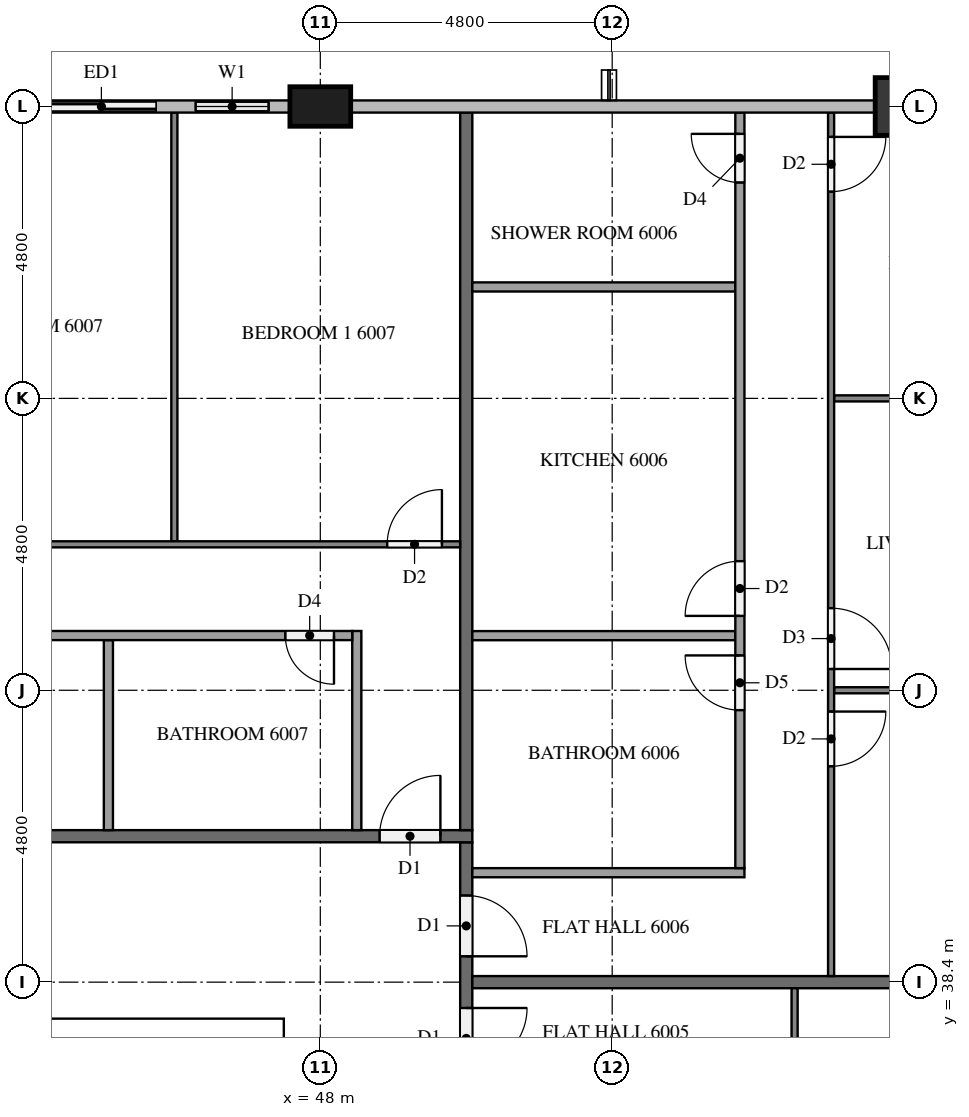
"""IFC4 building model, lengths in metres.
Left out: names, types, materials, properties, quantities, classifications, styles, units other than length and angle.
Written with IfcOpenShell. Run it as: python <this file> out.ifc"""

import sys

from ifc_helpers import new_model, si_unit, direction, frame, frame_2d, origin, origin_2d, place, context, subcontext, project, spatial, rectangle, extrude, element, fill, save


model = new_model("IFC4")
c1 = context("Model", 3, precision=1e-05, world=origin(), true_north=direction((0.0, 1.0)))
c2 = subcontext(c1, "Body", "Model", "MODEL_VIEW")
j1 = project(units=[si_unit("LENGTHUNIT", "METRE"), si_unit("PLANEANGLEUNIT", "RADIAN")], contexts=[c1])
p1 = place(None, origin())
s1 = spatial("IfcSite", under=j1, at=p1, CompositionType="ELEMENT")
p2 = place(p1, origin())
s2 = spatial("IfcBuilding", under=s1, at=p2, CompositionType="ELEMENT")
p3 = place(p2, frame((0.0, 0.0, 229.8)))
s3 = spatial("IfcBuildingStorey", under=s2, at=p3, CompositionType="ELEMENT", Elevation=229.8)
p4 = place(p3, frame((15.0, 37.45, 0.0), z_axis=(0.0, 0.0, 1.0), x_axis=(1.0, 0.0, 0.0)))
e1 = element("IfcWall", 1, at=p4, inside=s3, PredefinedType="SHEAR", context=c2, shape_type="SweptSolid", body=[
    extrude(rectangle(XDim=32.4, YDim=0.7, at=frame_2d((16.2, 0.0))), origin(), (0.0, 0.0, 1.0), 3.1),
])
p5 = place(p4, frame((15.3, 0.0, 0.0)))
e2 = element("IfcOpeningElement", 2, at=p5, cuts=e1, PredefinedType="OPENING", context=c2, shape_type="SweptSolid", body=[
    extrude(rectangle(XDim=1.8, YDim=2.1, at=frame_2d((0.9, 1.05))), frame((0.0, 0.36, 0.0), z_axis=(0.0, -1.0, 0.0), x_axis=(1.0, 0.0, 0.0)), (0.0, 0.0, 1.0), 0.72),
])
p6 = place(p4, frame((1.544, 0.0, 0.0)))
e3 = element("IfcOpeningElement", 3, at=p6, cuts=e1, PredefinedType="OPENING", context=c2, shape_type="SweptSolid", body=[
    extrude(rectangle(XDim=1.0, YDim=2.1, at=frame_2d((0.5, 1.05))), frame((0.0, 0.36, 0.0), z_axis=(0.0, -1.0, 0.0), x_axis=(1.0, 0.0, 0.0)), (0.0, 0.0, 1.0), 0.72),
])
p7 = place(p4, frame((5.219, 0.0, 0.0)))
e4 = element("IfcOpeningElement", 4, at=p7, cuts=e1, PredefinedType="OPENING", context=c2, shape_type="SweptSolid", body=[
    extrude(rectangle(XDim=1.0, YDim=2.1, at=frame_2d((0.5, 1.05))), frame((0.0, 0.36, 0.0), z_axis=(0.0, -1.0, 0.0), x_axis=(1.0, 0.0, 0.0)), (0.0, 0.0, 1.0), 0.72),
])
p8 = place(p3, frame((57.6, 52.8, 0.0), z_axis=(0.0, 0.0, 1.0), x_axis=(1.0, 0.0, 0.0)))
e5 = element("IfcColumn", 5, at=p8, inside=s3, PredefinedType="COLUMN", context=c2, shape_type="SweptSolid", body=[
    extrude(rectangle(XDim=0.95, YDim=0.95, at=origin_2d()), origin(), (0.0, 0.0, 1.0), 3.1),
])
p9 = place(p3, frame((48.0, 52.8, 0.0), z_axis=(0.0, 0.0, 1.0), x_axis=(1.0, 0.0, 0.0)))
e6 = element("IfcColumn", 6, at=p9, inside=s3, PredefinedType="COLUMN", context=c2, shape_type="SweptSolid", body=[
    extrude(rectangle(XDim=1.0, YDim=0.65, at=origin_2d()), origin(), (0.0, 0.0, 1.0), 3.1),
])
p10 = place(p3, frame((47.5, 52.8, 0.0), z_axis=(0.0, 0.0, 1.0), x_axis=(-1.0, 0.0, 0.0)))
e7 = element("IfcWall", 7, at=p10, inside=s3, PredefinedType="SOLIDWALL", context=c2, shape_type="SweptSolid", body=[
    extrude(rectangle(XDim=4.3, YDim=0.15, at=frame_2d((2.15, 0.0))), origin(), (0.0, 0.0, 1.0), 3.1),
])
p11 = place(p10, frame((0.35, 0.0, 0.9)))
e8 = element("IfcOpeningElement", 8, at=p11, cuts=e7, PredefinedType="OPENING", context=c2, shape_type="SweptSolid", body=[
    extrude(rectangle(XDim=1.2, YDim=1.4, at=frame_2d((0.6, 0.7))), frame((0.0, 0.085, 0.0), z_axis=(0.0, -1.0, 0.0), x_axis=(1.0, 0.0, 0.0)), (0.0, 0.0, 1.0), 0.17),
])
p12 = place(p10, frame((2.2, 0.0, 0.0)))
e9 = element("IfcOpeningElement", 9, at=p12, cuts=e7, PredefinedType="OPENING", context=c2, shape_type="SweptSolid", body=[
    extrude(rectangle(XDim=1.8, YDim=2.4, at=frame_2d((0.9, 1.2))), frame((0.0, 0.085, 0.0), z_axis=(0.0, -1.0, 0.0), x_axis=(1.0, 0.0, 0.0)), (0.0, 0.0, 1.0), 0.17),
])
p13 = place(p3, frame((50.4, 40.7, 0.0), z_axis=(0.0, 0.0, 1.0), x_axis=(0.0, -1.0, 0.0)))
e10 = element("IfcWall", 10, at=p13, inside=s3, PredefinedType="PARTITIONING", context=c2, shape_type="SweptSolid", body=[
    extrude(rectangle(XDim=28.6, YDim=0.2, at=frame_2d((14.3, 0.0))), origin(), (0.0, 0.0, 1.0), 3.1),
])
p14 = place(p13, frame((27.275, 0.0, 0.0)))
e11 = element("IfcOpeningElement", 11, at=p14, cuts=e10, PredefinedType="OPENING", context=c2, shape_type="SweptSolid", body=[
    extrude(rectangle(XDim=1.0, YDim=2.1, at=frame_2d((0.5, 1.05))), frame((0.0, 0.11, 0.0), z_axis=(0.0, -1.0, 0.0), x_axis=(1.0, 0.0, 0.0)), (0.0, 0.0, 1.0), 0.22),
])
p15 = place(p13, frame((2.725, 0.0, 0.0)))
e12 = element("IfcOpeningElement", 12, at=p15, cuts=e10, PredefinedType="OPENING", context=c2, shape_type="SweptSolid", body=[
    extrude(rectangle(XDim=1.0, YDim=2.1, at=frame_2d((0.5, 1.05))), frame((0.0, 0.11, 0.0), z_axis=(0.0, -1.0, 0.0), x_axis=(1.0, 0.0, 0.0)), (0.0, 0.0, 1.0), 0.22),
])
p16 = place(p13, frame((0.875, 0.0, 0.0)))
e13 = element("IfcOpeningElement", 13, at=p16, cuts=e10, PredefinedType="OPENING", context=c2, shape_type="SweptSolid", body=[
    extrude(rectangle(XDim=1.0, YDim=2.1, at=frame_2d((0.5, 1.05))), frame((0.0, 0.11, 0.0), z_axis=(0.0, -1.0, 0.0), x_axis=(1.0, 0.0, 0.0)), (0.0, 0.0, 1.0), 0.22),
])
p17 = place(p3, frame((11.9, 40.8, 0.0), z_axis=(0.0, 0.0, 1.0), x_axis=(1.0, 0.0, 0.0)))
e14 = element("IfcWall", 14, at=p17, inside=s3, PredefinedType="PARTITIONING", context=c2, shape_type="SweptSolid", body=[
    extrude(rectangle(XDim=38.6, YDim=0.2, at=frame_2d((19.3, 0.0))), origin(), (0.0, 0.0, 1.0), 3.1),
])
p18 = place(p17, frame((37.075, 0.0, 0.0)))
e15 = element("IfcOpeningElement", 15, at=p18, cuts=e14, PredefinedType="OPENING", context=c2, shape_type="SweptSolid", body=[
    extrude(rectangle(XDim=1.0, YDim=2.1, at=frame_2d((0.5, 1.05))), frame((0.0, 0.11, 0.0), z_axis=(0.0, -1.0, 0.0), x_axis=(1.0, 0.0, 0.0)), (0.0, 0.0, 1.0), 0.22),
])
p19 = place(p17, frame((12.525, 0.0, 0.0)))
e16 = element("IfcOpeningElement", 16, at=p19, cuts=e14, PredefinedType="OPENING", context=c2, shape_type="SweptSolid", body=[
    extrude(rectangle(XDim=1.0, YDim=2.1, at=frame_2d((0.5, 1.05))), frame((0.0, 0.11, 0.0), z_axis=(0.0, -1.0, 0.0), x_axis=(1.0, 0.0, 0.0)), (0.0, 0.0, 1.0), 0.22),
])
p20 = place(p17, frame((10.625, 0.0, 0.0)))
e17 = element("IfcOpeningElement", 17, at=p20, cuts=e14, PredefinedType="OPENING", context=c2, shape_type="SweptSolid", body=[
    extrude(rectangle(XDim=1.1, YDim=2.1, at=frame_2d((0.55, 1.05))), frame((0.0, 0.11, 0.0), z_axis=(0.0, -1.0, 0.0), x_axis=(1.0, 0.0, 0.0)), (0.0, 0.0, 1.0), 0.22),
])
p21 = place(p3, frame((50.5, 38.4, 0.0), z_axis=(0.0, 0.0, 1.0), x_axis=(1.0, 0.0, 0.0)))
e18 = element("IfcWall", 18, at=p21, inside=s3, PredefinedType="PARTITIONING", context=c2, shape_type="SweptSolid", body=[
    extrude(rectangle(XDim=11.575, YDim=0.2, at=frame_2d((5.788, 0.0))), origin(), (0.0, 0.0, 1.0), 3.1),
])
p22 = place(p3, frame((50.4, 40.9, 0.0), z_axis=(0.0, 0.0, 1.0), x_axis=(0.0, 1.0, 0.0)))
e19 = element("IfcWall", 19, at=p22, inside=s3, PredefinedType="PARTITIONING", context=c2, shape_type="SweptSolid", body=[
    extrude(rectangle(XDim=11.8, YDim=0.2, at=frame_2d((5.9, 0.0))), origin(), (0.0, 0.0, 1.0), 3.1),
])
p23 = place(p3, frame((55.8, 38.3, 0.0), z_axis=(0.0, 0.0, 1.0), x_axis=(0.0, -1.0, 0.0)))
e20 = element("IfcWall", 20, at=p23, inside=s3, PredefinedType="PARTITIONING", context=c2, shape_type="SweptSolid", body=[
    extrude(rectangle(XDim=9.4, YDim=0.1, at=frame_2d((4.7, 0.0))), origin(), (0.0, 0.0, 1.0), 3.1),
])
p24 = place(p23, frame((3.35, 0.0, 0.0)))
e21 = element("IfcOpeningElement", 21, at=p24, cuts=e20, PredefinedType="OPENING", context=c2, shape_type="SweptSolid", body=[
    extrude(rectangle(XDim=1.0, YDim=2.1, at=frame_2d((0.5, 1.05))), frame((0.0, 0.06, 0.0), z_axis=(0.0, -1.0, 0.0), x_axis=(1.0, 0.0, 0.0)), (0.0, 0.0, 1.0), 0.12),
])
p25 = place(p23, frame((5.05, 0.0, 0.0)))
e22 = element("IfcOpeningElement", 22, at=p25, cuts=e20, PredefinedType="OPENING", context=c2, shape_type="SweptSolid", body=[
    extrude(rectangle(XDim=0.9, YDim=2.1, at=frame_2d((0.45, 1.05))), frame((0.0, 0.06, 0.0), z_axis=(0.0, -1.0, 0.0), x_axis=(1.0, 0.0, 0.0)), (0.0, 0.0, 1.0), 0.12),
])
p26 = place(p3, frame((56.45, 43.2, 0.0), z_axis=(0.0, 0.0, 1.0), x_axis=(1.0, 0.0, 0.0)))
e23 = element("IfcWall", 23, at=p26, inside=s3, PredefinedType="PARTITIONING", context=c2, shape_type="SweptSolid", body=[
    extrude(rectangle(XDim=5.85, YDim=0.1, at=frame_2d((2.925, 0.0))), origin(), (0.0, 0.0, 1.0), 3.1),
])
p27 = place(p3, frame((56.45, 48.0, 0.0), z_axis=(0.0, 0.0, 1.0), x_axis=(1.0, 0.0, 0.0)))
e24 = element("IfcWall", 24, at=p27, inside=s3, PredefinedType="PARTITIONING", context=c2, shape_type="SweptSolid", body=[
    extrude(rectangle(XDim=5.475, YDim=0.1, at=frame_2d((2.738, 0.0))), origin(), (0.0, 0.0, 1.0), 3.1),
])
p28 = place(p3, frame((56.4, 52.7, 0.0), z_axis=(0.0, 0.0, 1.0), x_axis=(0.0, -1.0, 0.0)))
e25 = element("IfcWall", 25, at=p28, inside=s3, PredefinedType="PARTITIONING", context=c2, shape_type="SweptSolid", body=[
    extrude(rectangle(XDim=14.2, YDim=0.1, at=frame_2d((7.1, 0.0))), origin(), (0.0, 0.0, 1.0), 3.1),
])
p29 = place(p28, frame((9.85, 0.0, 0.0)))
e26 = element("IfcOpeningElement", 26, at=p29, cuts=e25, PredefinedType="OPENING", context=c2, shape_type="SweptSolid", body=[
    extrude(rectangle(XDim=0.9, YDim=2.1, at=frame_2d((0.45, 1.05))), frame((0.0, 0.06, 0.0), z_axis=(0.0, -1.0, 0.0), x_axis=(1.0, 0.0, 0.0)), (0.0, 0.0, 1.0), 0.12),
])
p30 = place(p28, frame((8.15, 0.0, 0.0)))
e27 = element("IfcOpeningElement", 27, at=p30, cuts=e25, PredefinedType="OPENING", context=c2, shape_type="SweptSolid", body=[
    extrude(rectangle(XDim=1.0, YDim=2.1, at=frame_2d((0.5, 1.05))), frame((0.0, 0.06, 0.0), z_axis=(0.0, -1.0, 0.0), x_axis=(1.0, 0.0, 0.0)), (0.0, 0.0, 1.0), 0.12),
])
p31 = place(p28, frame((0.4, 0.0, 0.0)))
e28 = element("IfcOpeningElement", 28, at=p31, cuts=e25, PredefinedType="OPENING", context=c2, shape_type="SweptSolid", body=[
    extrude(rectangle(XDim=0.9, YDim=2.1, at=frame_2d((0.45, 1.05))), frame((0.0, 0.06, 0.0), z_axis=(0.0, -1.0, 0.0), x_axis=(1.0, 0.0, 0.0)), (0.0, 0.0, 1.0), 0.12),
])
for number, where, z_axis, x_axis in (
    (29, (50.5, 44.098, 0.0), (0.0, 0.0, 1.0), (1.0, 0.0, 0.0)),
    (30, (50.5, 49.833, 0.0), (0.0, 0.0, 1.0), (1.0, 0.0, 0.0)),
):
    element("IfcWall", number, at=place(p3, frame(where, z_axis=z_axis, x_axis=x_axis)), inside=s3, PredefinedType="PARTITIONING", context=c2, shape_type="SweptSolid", body=[
        extrude(rectangle(XDim=4.325, YDim=0.15, at=frame_2d((2.163, 0.0))), origin(), (0.0, 0.0, 1.0), 3.1),
    ])
p32 = place(p3, frame((50.5, 40.2, 0.0), z_axis=(0.0, 0.0, 1.0), x_axis=(1.0, 0.0, 0.0)))
e31 = element("IfcWall", 31, at=p32, inside=s3, PredefinedType="PARTITIONING", context=c2, shape_type="SweptSolid", body=[
    extrude(rectangle(XDim=4.475, YDim=0.15, at=frame_2d((2.238, 0.0))), origin(), (0.0, 0.0, 1.0), 3.1),
])
p33 = place(p3, frame((54.9, 40.275, 0.0), z_axis=(0.0, 0.0, 1.0), x_axis=(0.0, 1.0, 0.0)))
e32 = element("IfcWall", 32, at=p33, inside=s3, PredefinedType="PARTITIONING", context=c2, shape_type="SweptSolid", body=[
    extrude(rectangle(XDim=12.425, YDim=0.15, at=frame_2d((6.212, 0.0))), origin(), (0.0, 0.0, 1.0), 3.1),
])
p34 = place(p33, frame((2.598, 0.0, 0.0)))
e33 = element("IfcOpeningElement", 33, at=p34, cuts=e32, PredefinedType="OPENING", context=c2, shape_type="SweptSolid", body=[
    extrude(rectangle(XDim=0.9, YDim=2.1, at=frame_2d((0.45, 1.05))), frame((0.0, 0.085, 0.0), z_axis=(0.0, -1.0, 0.0), x_axis=(1.0, 0.0, 0.0)), (0.0, 0.0, 1.0), 0.17),
])
p35 = place(p33, frame((4.148, 0.0, 0.0)))
e34 = element("IfcOpeningElement", 34, at=p35, cuts=e32, PredefinedType="OPENING", context=c2, shape_type="SweptSolid", body=[
    extrude(rectangle(XDim=0.9, YDim=2.1, at=frame_2d((0.45, 1.05))), frame((0.0, 0.085, 0.0), z_axis=(0.0, -1.0, 0.0), x_axis=(1.0, 0.0, 0.0)), (0.0, 0.0, 1.0), 0.17),
])
p36 = place(p33, frame((11.275, 0.0, 0.0)))
e35 = element("IfcOpeningElement", 35, at=p36, cuts=e32, PredefinedType="OPENING", context=c2, shape_type="SweptSolid", body=[
    extrude(rectangle(XDim=0.8, YDim=2.1, at=frame_2d((0.4, 1.05))), frame((0.0, 0.085, 0.0), z_axis=(0.0, -1.0, 0.0), x_axis=(1.0, 0.0, 0.0)), (0.0, 0.0, 1.0), 0.17),
])
p37 = place(p3, frame((45.6, 45.65, 0.0), z_axis=(0.0, 0.0, 1.0), x_axis=(0.0, 1.0, 0.0)))
e36 = element("IfcWall", 36, at=p37, inside=s3, PredefinedType="PARTITIONING", context=c2, shape_type="SweptSolid", body=[
    extrude(rectangle(XDim=7.05, YDim=0.1, at=frame_2d((3.525, 0.0))), origin(), (0.0, 0.0, 1.0), 3.1),
])
p38 = place(p3, frame((38.5, 45.6, 0.0), z_axis=(0.0, 0.0, 1.0), x_axis=(1.0, 0.0, 0.0)))
e37 = element("IfcWall", 37, at=p38, inside=s3, PredefinedType="PARTITIONING", context=c2, shape_type="SweptSolid", body=[
    extrude(rectangle(XDim=11.8, YDim=0.1, at=frame_2d((5.9, 0.0))), origin(), (0.0, 0.0, 1.0), 3.1),
])
p39 = place(p38, frame((10.6, 0.0, 0.0)))
e38 = element("IfcOpeningElement", 38, at=p39, cuts=e37, PredefinedType="OPENING", context=c2, shape_type="SweptSolid", body=[
    extrude(rectangle(XDim=0.9, YDim=2.1, at=frame_2d((0.45, 1.05))), frame((0.0, 0.06, 0.0), z_axis=(0.0, -1.0, 0.0), x_axis=(1.0, 0.0, 0.0)), (0.0, 0.0, 1.0), 0.12),
])
p40 = place(p38, frame((0.3, 0.0, 0.0)))
e39 = element("IfcOpeningElement", 39, at=p40, cuts=e37, PredefinedType="OPENING", context=c2, shape_type="SweptSolid", body=[
    extrude(rectangle(XDim=1.0, YDim=2.1, at=frame_2d((0.5, 1.05))), frame((0.0, 0.06, 0.0), z_axis=(0.0, -1.0, 0.0), x_axis=(1.0, 0.0, 0.0)), (0.0, 0.0, 1.0), 0.12),
])
p41 = place(p3, frame((44.515, 40.9, 0.0), z_axis=(0.0, 0.0, 1.0), x_axis=(0.0, 1.0, 0.0)))
e40 = element("IfcWall", 40, at=p41, inside=s3, PredefinedType="PARTITIONING", context=c2, shape_type="SweptSolid", body=[
    extrude(rectangle(XDim=3.125, YDim=0.15, at=frame_2d((1.562, 0.0))), origin(), (0.0, 0.0, 1.0), 3.1),
])
p42 = place(p3, frame((48.6, 40.9, 0.0), z_axis=(0.0, 0.0, 1.0), x_axis=(0.0, 1.0, 0.0)))
e41 = element("IfcWall", 41, at=p42, inside=s3, PredefinedType="PARTITIONING", context=c2, shape_type="SweptSolid", body=[
    extrude(rectangle(XDim=3.275, YDim=0.15, at=frame_2d((1.638, 0.0))), origin(), (0.0, 0.0, 1.0), 3.1),
])
p43 = place(p3, frame((48.525, 44.1, 0.0), z_axis=(0.0, 0.0, 1.0), x_axis=(-1.0, 0.0, 0.0)))
e42 = element("IfcWall", 42, at=p43, inside=s3, PredefinedType="PARTITIONING", context=c2, shape_type="SweptSolid", body=[
    extrude(rectangle(XDim=10.025, YDim=0.15, at=frame_2d((5.012, 0.0))), origin(), (0.0, 0.0, 1.0), 3.1),
])
p44 = place(p43, frame((0.3, 0.0, 0.0)))
e43 = element("IfcOpeningElement", 43, at=p44, cuts=e42, PredefinedType="OPENING", context=c2, shape_type="SweptSolid", body=[
    extrude(rectangle(XDim=0.8, YDim=2.1, at=frame_2d((0.4, 1.05))), frame((0.0, 0.085, 0.0), z_axis=(0.0, -1.0, 0.0), x_axis=(1.0, 0.0, 0.0)), (0.0, 0.0, 1.0), 0.17),
])
p45 = place(p43, frame((8.775, 0.0, 0.0)))
e44 = element("IfcOpeningElement", 44, at=p45, cuts=e42, PredefinedType="OPENING", context=c2, shape_type="SweptSolid", body=[
    extrude(rectangle(XDim=0.9, YDim=2.1, at=frame_2d((0.45, 1.05))), frame((0.0, 0.085, 0.0), z_axis=(0.0, -1.0, 0.0), x_axis=(1.0, 0.0, 0.0)), (0.0, 0.0, 1.0), 0.17),
])
p46 = place(p11, origin())
e45 = element("IfcWindow", 45, at=p46, inside=s3, PartitioningType="SINGLE_PANEL", PredefinedType="WINDOW", context=c2, shape_type="SweptSolid", body=[
    extrude(rectangle(XDim=1.2, YDim=1.4, at=frame_2d((0.6, 0.7))), frame((0.0, 0.03, 0.0), z_axis=(0.0, -1.0, 0.0), x_axis=(1.0, 0.0, 0.0)), (0.0, 0.0, 1.0), 0.06),
])
fill(e8, e45)
p47 = place(p12, origin())
e46 = element("IfcDoor", 46, at=p47, inside=s3, OperationType="SLIDING_TO_LEFT", PredefinedType="DOOR", context=c2, shape_type="SweptSolid", body=[
    extrude(rectangle(XDim=1.8, YDim=2.4, at=frame_2d((0.9, 1.2))), frame((0.0, 0.025, 0.0), z_axis=(0.0, -1.0, 0.0), x_axis=(1.0, 0.0, 0.0)), (0.0, 0.0, 1.0), 0.05),
])
fill(e9, e46)
p48 = place(p15, origin())
e47 = element("IfcDoor", 47, at=p48, inside=s3, OperationType="SINGLE_SWING_LEFT", PredefinedType="DOOR", context=c2, shape_type="SweptSolid", body=[
    extrude(rectangle(XDim=1.0, YDim=2.1, at=frame_2d((0.5, 1.05))), frame((0.0, 0.025, 0.0), z_axis=(0.0, -1.0, 0.0), x_axis=(1.0, 0.0, 0.0)), (0.0, 0.0, 1.0), 0.05),
])
fill(e12, e47)
p49 = place(p16, origin())
e48 = element("IfcDoor", 48, at=p49, inside=s3, OperationType="SINGLE_SWING_RIGHT", PredefinedType="DOOR", context=c2, shape_type="SweptSolid", body=[
    extrude(rectangle(XDim=1.0, YDim=2.1, at=frame_2d((0.5, 1.05))), frame((0.0, 0.025, 0.0), z_axis=(0.0, -1.0, 0.0), x_axis=(1.0, 0.0, 0.0)), (0.0, 0.0, 1.0), 0.05),
])
fill(e13, e48)
p50 = place(p18, origin())
e49 = element("IfcDoor", 49, at=p50, inside=s3, OperationType="SINGLE_SWING_RIGHT", PredefinedType="DOOR", context=c2, shape_type="SweptSolid", body=[
    extrude(rectangle(XDim=1.0, YDim=2.1, at=frame_2d((0.5, 1.05))), frame((0.0, 0.025, 0.0), z_axis=(0.0, -1.0, 0.0), x_axis=(1.0, 0.0, 0.0)), (0.0, 0.0, 1.0), 0.05),
])
fill(e15, e49)
p51 = place(p29, origin())
e50 = element("IfcDoor", 50, at=p51, inside=s3, OperationType="SINGLE_SWING_LEFT", PredefinedType="DOOR", context=c2, shape_type="SweptSolid", body=[
    extrude(rectangle(XDim=0.9, YDim=2.1, at=frame_2d((0.45, 1.05))), frame((0.0, 0.025, 0.0), z_axis=(0.0, -1.0, 0.0), x_axis=(1.0, 0.0, 0.0)), (0.0, 0.0, 1.0), 0.05),
])
fill(e26, e50)
p52 = place(p30, origin())
e51 = element("IfcDoor", 51, at=p52, inside=s3, OperationType="SINGLE_SWING_RIGHT", PredefinedType="DOOR", context=c2, shape_type="SweptSolid", body=[
    extrude(rectangle(XDim=1.0, YDim=2.1, at=frame_2d((0.5, 1.05))), frame((0.0, 0.025, 0.0), z_axis=(0.0, -1.0, 0.0), x_axis=(1.0, 0.0, 0.0)), (0.0, 0.0, 1.0), 0.05),
])
fill(e27, e51)
p53 = place(p31, origin())
e52 = element("IfcDoor", 52, at=p53, inside=s3, OperationType="SINGLE_SWING_LEFT", PredefinedType="DOOR", context=c2, shape_type="SweptSolid", body=[
    extrude(rectangle(XDim=0.9, YDim=2.1, at=frame_2d((0.45, 1.05))), frame((0.0, 0.025, 0.0), z_axis=(0.0, -1.0, 0.0), x_axis=(1.0, 0.0, 0.0)), (0.0, 0.0, 1.0), 0.05),
])
fill(e28, e52)
p54 = place(p34, origin())
e53 = element("IfcDoor", 53, at=p54, inside=s3, OperationType="SINGLE_SWING_RIGHT", PredefinedType="DOOR", context=c2, shape_type="SweptSolid", body=[
    extrude(rectangle(XDim=0.9, YDim=2.1, at=frame_2d((0.45, 1.05))), frame((0.0, 0.025, 0.0), z_axis=(0.0, -1.0, 0.0), x_axis=(1.0, 0.0, 0.0)), (0.0, 0.0, 1.0), 0.05),
])
fill(e33, e53)
p55 = place(p35, origin())
e54 = element("IfcDoor", 54, at=p55, inside=s3, OperationType="SINGLE_SWING_LEFT", PredefinedType="DOOR", context=c2, shape_type="SweptSolid", body=[
    extrude(rectangle(XDim=0.9, YDim=2.1, at=frame_2d((0.45, 1.05))), frame((0.0, 0.025, 0.0), z_axis=(0.0, -1.0, 0.0), x_axis=(1.0, 0.0, 0.0)), (0.0, 0.0, 1.0), 0.05),
])
fill(e34, e54)
p56 = place(p36, origin())
e55 = element("IfcDoor", 55, at=p56, inside=s3, OperationType="SINGLE_SWING_RIGHT", PredefinedType="DOOR", context=c2, shape_type="SweptSolid", body=[
    extrude(rectangle(XDim=0.8, YDim=2.1, at=frame_2d((0.4, 1.05))), frame((0.0, 0.025, 0.0), z_axis=(0.0, -1.0, 0.0), x_axis=(1.0, 0.0, 0.0)), (0.0, 0.0, 1.0), 0.05),
])
fill(e35, e55)
p57 = place(p39, origin())
e56 = element("IfcDoor", 56, at=p57, inside=s3, OperationType="SINGLE_SWING_RIGHT", PredefinedType="DOOR", context=c2, shape_type="SweptSolid", body=[
    extrude(rectangle(XDim=0.9, YDim=2.1, at=frame_2d((0.45, 1.05))), frame((0.0, 0.025, 0.0), z_axis=(0.0, -1.0, 0.0), x_axis=(1.0, 0.0, 0.0)), (0.0, 0.0, 1.0), 0.05),
])
fill(e38, e56)
p58 = place(p44, origin())
e57 = element("IfcDoor", 57, at=p58, inside=s3, OperationType="SINGLE_SWING_LEFT", PredefinedType="DOOR", context=c2, shape_type="SweptSolid", body=[
    extrude(rectangle(XDim=0.8, YDim=2.1, at=frame_2d((0.4, 1.05))), frame((0.0, 0.025, 0.0), z_axis=(0.0, -1.0, 0.0), x_axis=(1.0, 0.0, 0.0)), (0.0, 0.0, 1.0), 0.05),
])
fill(e43, e57)
save(model, sys.argv[1])
